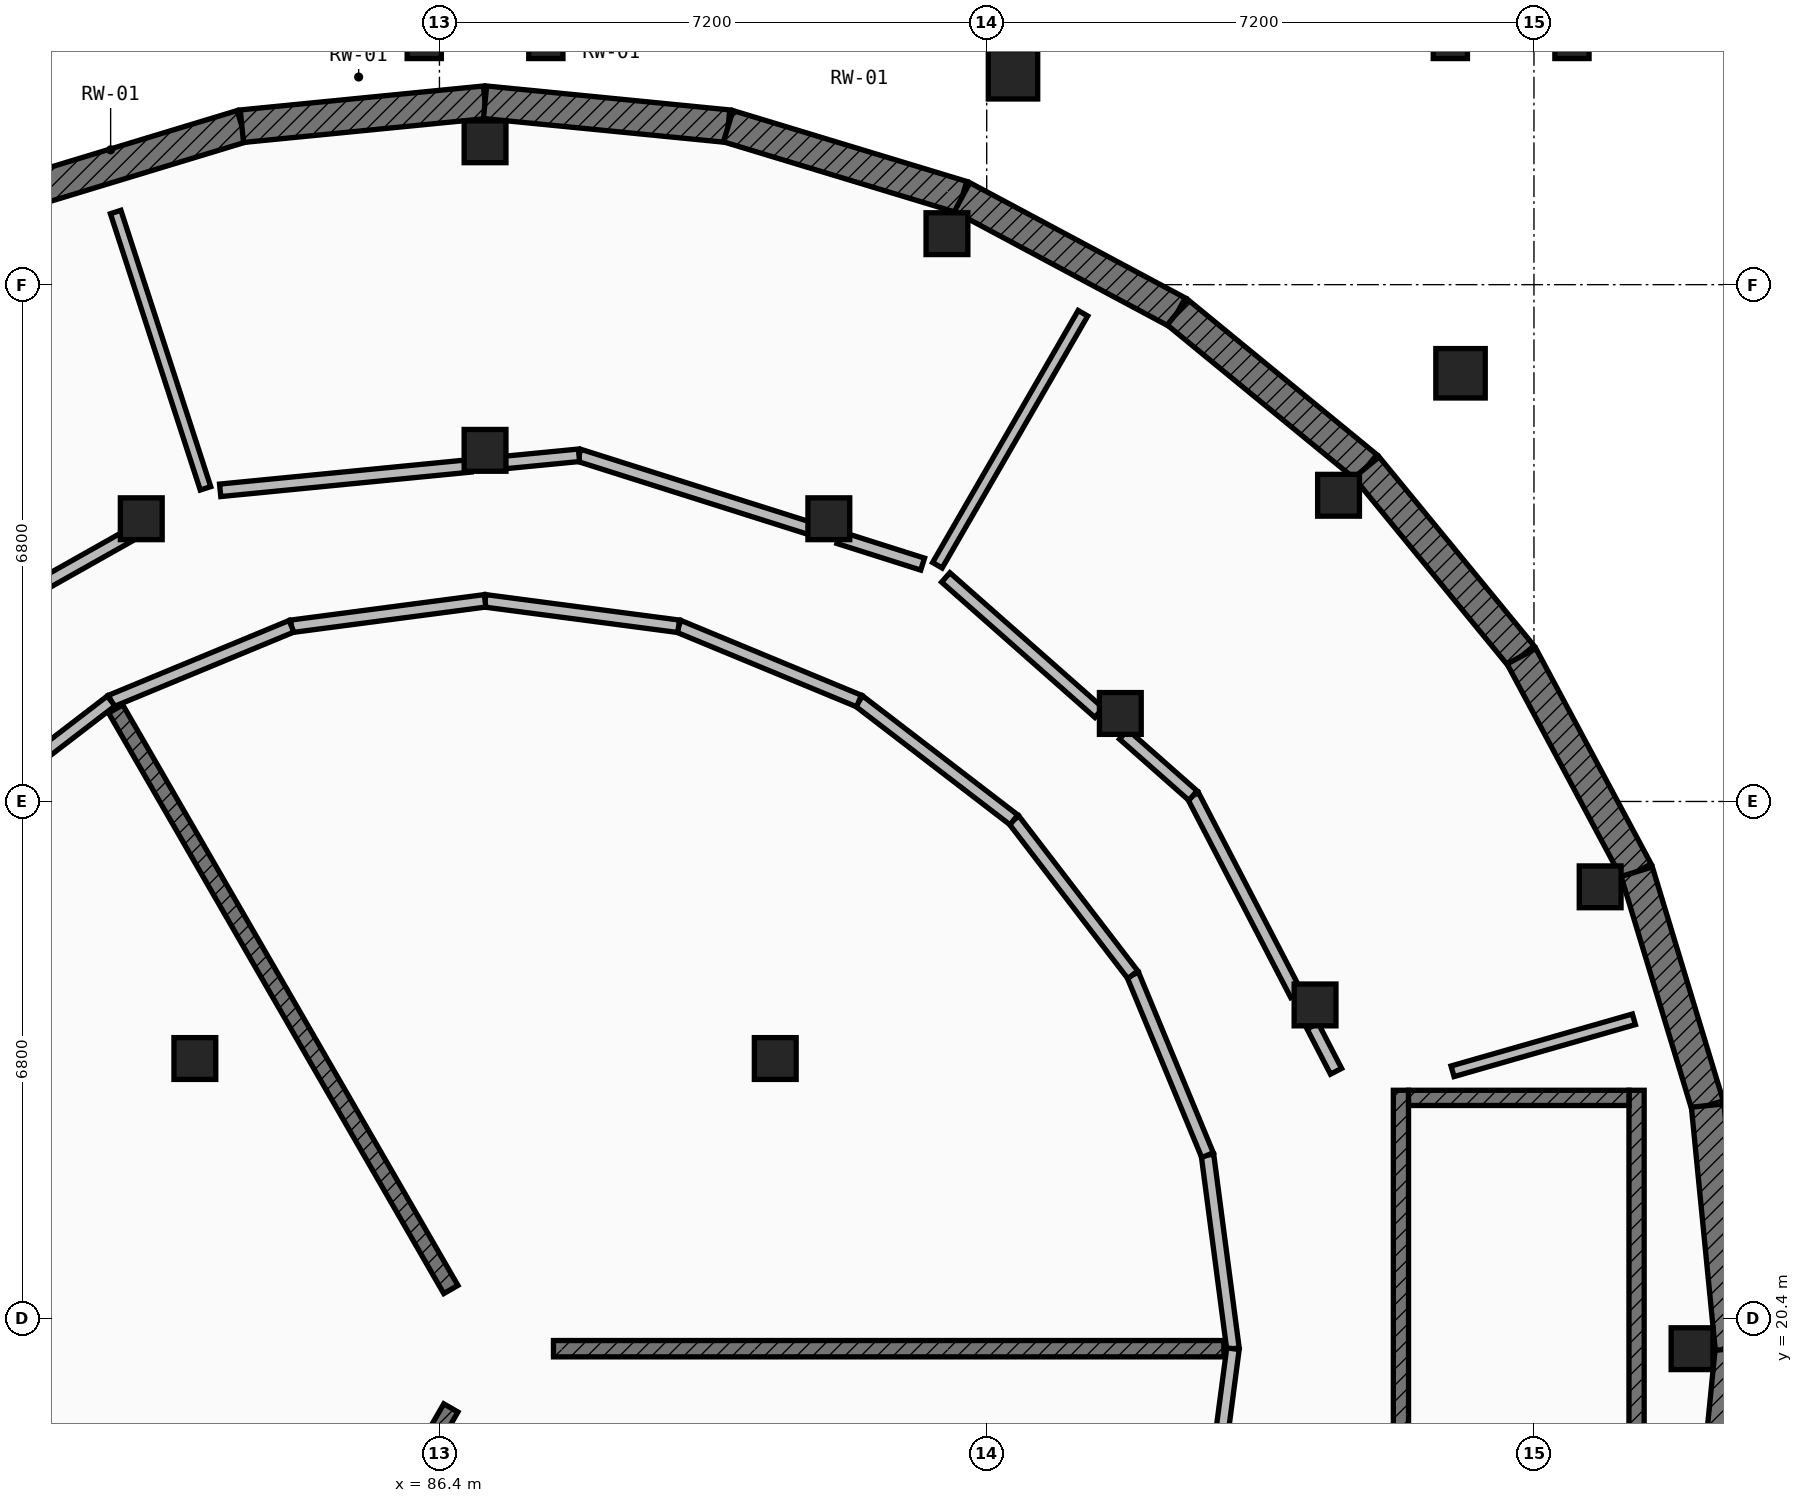
"""IFC4 building model, lengths in metres.
Left out: names, types, materials, properties, quantities, classifications, styles, units other than length and angle.
Written with IfcOpenShell. Run it as: python <this file> out.ifc"""

import sys

from ifc_helpers import new_model, si_unit, direction, frame, frame_2d, origin, origin_2d, place, context, subcontext, project, spatial, rectangle, extrude, element, fill, save


model = new_model("IFC4")
c1 = context("Model", 3, precision=1e-05, world=origin(), true_north=direction((0.0, 1.0)))
c2 = subcontext(c1, "Body", "Model", "MODEL_VIEW")
j1 = project(units=[si_unit("LENGTHUNIT", "METRE"), si_unit("PLANEANGLEUNIT", "RADIAN")], contexts=[c1])
p1 = place(None, origin())
s1 = spatial("IfcSite", under=j1, at=p1, CompositionType="ELEMENT")
p2 = place(p1, origin())
s2 = spatial("IfcBuilding", under=s1, at=p2, CompositionType="ELEMENT")
p3 = place(p2, frame((0.0, 0.0, -4.55)))
s3 = spatial("IfcBuildingStorey", under=s2, at=p3, CompositionType="ELEMENT", Elevation=-4.55)
for number, where, z_axis, x_axis in (
    (1, (102.88, 20.0, 0.0), (0.0, 0.0, 1.0), (1.0, 0.0, 0.0)),
    (2, (101.671, 26.077, 0.0), (0.0, 0.0, 1.0), (1.0, 0.0, 0.0)),
    (3, (98.229, 31.229, 0.0), (0.0, 0.0, 1.0), (1.0, 0.0, 0.0)),
    (4, (93.077, 34.671, 0.0), (0.0, 0.0, 1.0), (1.0, 0.0, 0.0)),
    (5, (87.0, 35.88, 0.0), (0.0, 0.0, 1.0), (1.0, 0.0, 0.0)),
    (6, (97.92, 24.523, 0.0), (0.0, 0.0, 1.0), (1.0, 0.0, 0.0)),
    (7, (95.358, 28.358, 0.0), (0.0, 0.0, 1.0), (1.0, 0.0, 0.0)),
    (8, (91.523, 30.92, 0.0), (0.0, 0.0, 1.0), (1.0, 0.0, 0.0)),
    (9, (87.0, 31.82, 0.0), (0.0, 0.0, 1.0), (1.0, 0.0, 0.0)),
    (10, (82.477, 30.92, 0.0), (0.0, 0.0, 1.0), (1.0, 0.0, 0.0)),
    (11, (90.818, 23.818, 0.0), (0.0, 0.0, 1.0), (1.0, 0.0, 0.0)),
    (12, (83.182, 23.818, 0.0), (0.0, 0.0, 1.0), (1.0, 0.0, 0.0)),
):
    element("IfcColumn", number, at=place(p3, frame(where, z_axis=z_axis, x_axis=x_axis)), inside=s3, PredefinedType="COLUMN", context=c2, shape_type="SweptSolid", body=[
        extrude(rectangle(XDim=0.55, YDim=0.55, at=origin_2d()), origin(), (0.0, 0.0, 1.0), 4.55),
    ])
for number, where, z_axis, x_axis in (
    (13, (99.834, 32.834, 0.0), (0.0, 0.0, 1.0), (1.0, 0.0, 0.0)),
    (14, (93.946, 36.768, 0.0), (0.0, 0.0, 1.0), (1.0, 0.0, 0.0)),
):
    element("IfcColumn", number, at=place(p3, frame(where, z_axis=z_axis, x_axis=x_axis)), inside=s3, PredefinedType="COLUMN", context=c2, shape_type="SweptSolid", body=[
        extrude(rectangle(XDim=0.65, YDim=0.65, at=origin_2d()), origin(), (0.0, 0.0, 1.0), 4.55),
    ])
for number, where, z_axis, x_axis in (
    (15, (99.7, 37.2, 0.0), (0.0, 0.0, 1.0), (1.0, 0.0, 0.0)),
    (16, (101.3, 37.2, 0.0), (0.0, 0.0, 1.0), (1.0, 0.0, 0.0)),
    (17, (86.2, 37.2, 0.0), (0.0, 0.0, 1.0), (1.0, 0.0, 0.0)),
    (18, (87.8, 37.2, 0.0), (0.0, 0.0, 1.0), (1.0, 0.0, 0.0)),
):
    element("IfcColumn", number, at=place(p3, frame(where, z_axis=z_axis, x_axis=x_axis)), inside=s3, PredefinedType="COLUMN", context=c2, shape_type="SweptSolid", body=[
        extrude(rectangle(XDim=0.45, YDim=0.45, at=origin_2d()), origin(), (0.0, 0.0, 1.0), 5.48),
    ])
p4 = place(p3, frame((103.4, 20.0, 0.0), z_axis=(0.0, 0.0, 1.0), x_axis=(-0.097977057849, -0.995188673637, 0.0)))
e19 = element("IfcWall", 19, at=p4, inside=s3, PredefinedType="USERDEFINED", context=c2, shape_type="SweptSolid", body=[
    extrude(rectangle(XDim=3.214, YDim=0.43, at=frame_2d((1.607, 0.0))), origin(), (0.0, 0.0, 1.0), 3.335),
])
p5 = place(p3, frame((80.724, 35.152, 0.0), z_axis=(0.0, 0.0, 1.0), x_axis=(0.956984161567, 0.29014016356, 0.0)))
e20 = element("IfcWall", 20, at=p5, inside=s3, PredefinedType="USERDEFINED", context=c2, shape_type="SweptSolid", body=[
    extrude(rectangle(XDim=3.215, YDim=0.43, at=frame_2d((1.607, 0.0))), origin(), (0.0, 0.0, 1.0), 3.335),
])
for number, where, z_axis, x_axis in (
    (21, (83.801, 36.085, 0.0), (0.0, 0.0, 1.0), (0.995, 0.098, 0.0)),
    (22, (87.0, 36.4, 0.0), (0.0, 0.0, 1.0), (0.995, -0.098, 0.0)),
):
    element("IfcWall", number, at=place(p3, frame(where, z_axis=z_axis, x_axis=x_axis)), inside=s3, PredefinedType="USERDEFINED", context=c2, shape_type="SweptSolid", body=[
        extrude(rectangle(XDim=3.214, YDim=0.43, at=frame_2d((1.607, 0.0))), origin(), (0.0, 0.0, 1.0), 3.335),
    ])
for number, where, z_axis, x_axis in (
    (23, (90.199, 36.085, 0.0), (0.0, 0.0, 1.0), (0.957, -0.29, 0.0)),
    (24, (93.276, 35.152, 0.0), (0.0, 0.0, 1.0), (0.882, -0.472, 0.0)),
    (25, (96.111, 33.636, 0.0), (0.0, 0.0, 1.0), (0.773, -0.634, 0.0)),
    (26, (98.597, 31.597, 0.0), (0.0, 0.0, 1.0), (0.634, -0.773, 0.0)),
    (27, (100.636, 29.111, 0.0), (0.0, 0.0, 1.0), (0.472, -0.882, 0.0)),
    (28, (102.152, 26.276, 0.0), (0.0, 0.0, 1.0), (0.29, -0.957, 0.0)),
):
    element("IfcWall", number, at=place(p3, frame(where, z_axis=z_axis, x_axis=x_axis)), inside=s3, PredefinedType="USERDEFINED", context=c2, shape_type="SweptSolid", body=[
        extrude(rectangle(XDim=3.215, YDim=0.43, at=frame_2d((1.607, 0.0))), origin(), (0.0, 0.0, 1.0), 3.335),
    ])
p6 = place(p3, frame((103.085, 23.199, 0.0), z_axis=(0.0, 0.0, 1.0), x_axis=(0.097977057849, -0.995188673637, 0.0)))
e29 = element("IfcWall", 29, at=p6, inside=s3, PredefinedType="USERDEFINED", context=c2, shape_type="SweptSolid", body=[
    extrude(rectangle(XDim=3.214, YDim=0.43, at=frame_2d((1.607, 0.0))), origin(), (0.0, 0.0, 1.0), 3.335),
])
p7 = place(p3, frame((99.05, 23.4, 0.0), z_axis=(0.0, 0.0, 1.0), x_axis=(0.0, -1.0, 0.0)))
e30 = element("IfcWall", 30, at=p7, inside=s3, PredefinedType="SHEAR", context=c2, shape_type="SweptSolid", body=[
    extrude(rectangle(XDim=6.8, YDim=0.2, at=frame_2d((3.4, 0.0))), origin(), (0.0, 0.0, 1.0), 4.135),
])
p8 = place(p7, frame((0.38, 0.0, 0.0)))
e31 = element("IfcOpeningElement", 31, at=p8, cuts=e30, PredefinedType="OPENING", context=c2, shape_type="SweptSolid", body=[
    extrude(rectangle(XDim=1.05, YDim=2.15, at=frame_2d((0.525, 1.075))), frame((0.0, 0.11, 0.0), z_axis=(0.0, -1.0, 0.0), x_axis=(1.0, 0.0, 0.0)), (0.0, 0.0, 1.0), 0.22),
])
p9 = place(p3, frame((102.15, 23.4, 0.0), z_axis=(0.0, 0.0, 1.0), x_axis=(0.0, -1.0, 0.0)))
e32 = element("IfcWall", 32, at=p9, inside=s3, PredefinedType="SHEAR", context=c2, shape_type="SweptSolid", body=[
    extrude(rectangle(XDim=6.8, YDim=0.2, at=frame_2d((3.4, 0.0))), origin(), (0.0, 0.0, 1.0), 4.135),
])
p10 = place(p3, frame((99.15, 23.3, 0.0), z_axis=(0.0, 0.0, 1.0), x_axis=(1.0, 0.0, 0.0)))
e33 = element("IfcWall", 33, at=p10, inside=s3, PredefinedType="SHEAR", context=c2, shape_type="SweptSolid", body=[
    extrude(rectangle(XDim=2.9, YDim=0.2, at=frame_2d((1.45, 0.0))), origin(), (0.0, 0.0, 1.0), 4.135),
])
p11 = place(p3, frame((87.9, 20.0, 0.0), z_axis=(0.0, 0.0, 1.0), x_axis=(1.0, 0.0, 0.0)))
e34 = element("IfcWall", 34, at=p11, inside=s3, PredefinedType="SOLIDWALL", context=c2, shape_type="SweptSolid", body=[
    extrude(rectangle(XDim=8.82, YDim=0.215, at=frame_2d((4.41, 0.0))), origin(), (0.0, 0.0, 1.0), 2.76),
])
for number, where, z_axis, x_axis in (
    (35, (86.55, 20.779, 0.0), (0.0, 0.0, 1.0), (-0.5, 0.866, 0.0)),
    (36, (86.55, 19.221, 0.0), (0.0, 0.0, 1.0), (-0.5, -0.866, 0.0)),
):
    element("IfcWall", number, at=place(p3, frame(where, z_axis=z_axis, x_axis=x_axis)), inside=s3, PredefinedType="SOLIDWALL", context=c2, shape_type="SweptSolid", body=[
        extrude(rectangle(XDim=8.821, YDim=0.215, at=frame_2d((4.41, 0.0))), origin(), (0.0, 0.0, 1.0), 2.76),
    ])
p12 = place(p3, frame((96.84, 20.0, 0.0), z_axis=(0.0, 0.0, 1.0), x_axis=(-0.130476636685, 0.991451384224, 0.0)))
e37 = element("IfcWall", 37, at=p12, inside=s3, PredefinedType="PARTITIONING", context=c2, shape_type="SweptSolid", body=[
    extrude(rectangle(XDim=2.569, YDim=0.165, at=frame_2d((1.285, 0.0))), origin(), (0.0, 0.0, 1.0), 2.76),
])
p13 = place(p3, frame((96.505, 22.547, 0.0), z_axis=(0.0, 0.0, 1.0), x_axis=(-0.382704397106, 0.923870848353, 0.0)))
e38 = element("IfcWall", 38, at=p13, inside=s3, PredefinedType="PARTITIONING", context=c2, shape_type="SweptSolid", body=[
    extrude(rectangle(XDim=2.568, YDim=0.165, at=frame_2d((1.284, 0.0))), origin(), (0.0, 0.0, 1.0), 2.76),
])
p14 = place(p3, frame((95.522, 24.92, 0.0), z_axis=(0.0, 0.0, 1.0), x_axis=(-0.608782621434, 0.793337078322, 0.0)))
e39 = element("IfcWall", 39, at=p14, inside=s3, PredefinedType="PARTITIONING", context=c2, shape_type="SweptSolid", body=[
    extrude(rectangle(XDim=2.569, YDim=0.165, at=frame_2d((1.285, 0.0))), origin(), (0.0, 0.0, 1.0), 2.76),
])
p15 = place(p3, frame((93.958, 26.958, 0.0), z_axis=(0.0, 0.0, 1.0), x_axis=(-0.793337078322, 0.608782621434, 0.0)))
e40 = element("IfcWall", 40, at=p15, inside=s3, PredefinedType="PARTITIONING", context=c2, shape_type="SweptSolid", body=[
    extrude(rectangle(XDim=2.569, YDim=0.165, at=frame_2d((1.285, 0.0))), origin(), (0.0, 0.0, 1.0), 2.76),
])
p16 = place(p15, frame((0.584, 0.0, 0.0)))
e41 = element("IfcOpeningElement", 41, at=p16, cuts=e40, PredefinedType="OPENING", context=c2, shape_type="SweptSolid", body=[
    extrude(rectangle(XDim=1.4, YDim=2.25, at=frame_2d((0.7, 1.125))), frame((0.0, 0.093, 0.0), z_axis=(0.0, -1.0, 0.0), x_axis=(1.0, 0.0, 0.0)), (0.0, 0.0, 1.0), 0.185),
])
p17 = place(p3, frame((91.92, 28.522, 0.0), z_axis=(0.0, 0.0, 1.0), x_axis=(-0.923870848353, 0.382704397106, 0.0)))
e42 = element("IfcWall", 42, at=p17, inside=s3, PredefinedType="PARTITIONING", context=c2, shape_type="SweptSolid", body=[
    extrude(rectangle(XDim=2.568, YDim=0.165, at=frame_2d((1.284, 0.0))), origin(), (0.0, 0.0, 1.0), 2.76),
])
for number, where, z_axis, x_axis in (
    (43, (89.547, 29.505, 0.0), (0.0, 0.0, 1.0), (-0.991, 0.13, 0.0)),
    (44, (87.0, 29.84, 0.0), (0.0, 0.0, 1.0), (-0.991, -0.13, 0.0)),
):
    element("IfcWall", number, at=place(p3, frame(where, z_axis=z_axis, x_axis=x_axis)), inside=s3, PredefinedType="PARTITIONING", context=c2, shape_type="SweptSolid", body=[
        extrude(rectangle(XDim=2.569, YDim=0.165, at=frame_2d((1.285, 0.0))), origin(), (0.0, 0.0, 1.0), 2.76),
    ])
p18 = place(p3, frame((84.453, 29.505, 0.0), z_axis=(0.0, 0.0, 1.0), x_axis=(-0.923870848353, -0.382704397106, 0.0)))
e45 = element("IfcWall", 45, at=p18, inside=s3, PredefinedType="PARTITIONING", context=c2, shape_type="SweptSolid", body=[
    extrude(rectangle(XDim=2.568, YDim=0.165, at=frame_2d((1.284, 0.0))), origin(), (0.0, 0.0, 1.0), 2.76),
])
for number, where, z_axis, x_axis in (
    (46, (82.08, 28.522, 0.0), (0.0, 0.0, 1.0), (-0.793, -0.609, 0.0)),
    (47, (96.505, 17.453, 0.0), (0.0, 0.0, 1.0), (0.13, 0.991, 0.0)),
):
    element("IfcWall", number, at=place(p3, frame(where, z_axis=z_axis, x_axis=x_axis)), inside=s3, PredefinedType="PARTITIONING", context=c2, shape_type="SweptSolid", body=[
        extrude(rectangle(XDim=2.569, YDim=0.165, at=frame_2d((1.285, 0.0))), origin(), (0.0, 0.0, 1.0), 2.76),
    ])
p19 = place(p3, frame((99.729, 23.65, 0.0), z_axis=(0.0, 0.0, 1.0), x_axis=(0.96127114667, 0.275604395065, 0.0)))
e48 = element("IfcWall", 48, at=p19, inside=s3, PredefinedType="PARTITIONING", context=c2, shape_type="SweptSolid", body=[
    extrude(rectangle(XDim=2.482, YDim=0.145, at=frame_2d((1.241, 0.0))), origin(), (0.0, 0.0, 1.0), 2.76),
])
p20 = place(p3, frame((92.951, 30.308, 0.0), z_axis=(0.0, 0.0, 1.0), x_axis=(0.500116129234, 0.865958346157, 0.0)))
e49 = element("IfcWall", 49, at=p20, inside=s3, PredefinedType="PARTITIONING", context=c2, shape_type="SweptSolid", body=[
    extrude(rectangle(XDim=3.829, YDim=0.145, at=frame_2d((1.915, 0.0))), origin(), (0.0, 0.0, 1.0), 2.76),
])
p21 = place(p3, frame((83.322, 31.32, 0.0), z_axis=(0.0, 0.0, 1.0), x_axis=(-0.309188585957, 0.951000745696, 0.0)))
e50 = element("IfcWall", 50, at=p21, inside=s3, PredefinedType="PARTITIONING", context=c2, shape_type="SweptSolid", body=[
    extrude(rectangle(XDim=3.823, YDim=0.145, at=frame_2d((1.912, 0.0))), origin(), (0.0, 0.0, 1.0), 2.76),
])
p22 = place(p3, frame((98.196, 23.65, 0.0), z_axis=(0.0, 0.0, 1.0), x_axis=(-0.459700365361, 0.888074081418, 0.0)))
e51 = element("IfcWall", 51, at=p22, inside=s3, PredefinedType="PARTITIONING", context=c2, shape_type="SweptSolid", body=[
    extrude(rectangle(XDim=0.67, YDim=0.165, at=frame_2d((0.335, 0.0))), origin(), (0.0, 0.0, 1.0), 2.76),
])
p23 = place(p3, frame((97.674, 24.657, 0.0), z_axis=(0.0, 0.0, 1.0), x_axis=(-0.460725075704, 0.887542902973, 0.0)))
e52 = element("IfcWall", 52, at=p23, inside=s3, PredefinedType="PARTITIONING", context=c2, shape_type="SweptSolid", body=[
    extrude(rectangle(XDim=2.952, YDim=0.165, at=frame_2d((1.476, 0.0))), origin(), (0.0, 0.0, 1.0), 2.76),
])
p24 = place(p23, frame((0.886, 0.0, 0.0)))
e53 = element("IfcOpeningElement", 53, at=p24, cuts=e52, PredefinedType="OPENING", context=c2, shape_type="SweptSolid", body=[
    extrude(rectangle(XDim=1.18, YDim=2.2, at=frame_2d((0.59, 1.1))), frame((0.0, 0.093, 0.0), z_axis=(0.0, -1.0, 0.0), x_axis=(1.0, 0.0, 0.0)), (0.0, 0.0, 1.0), 0.185),
])
p25 = place(p3, frame((96.314, 27.277, 0.0), z_axis=(0.0, 0.0, 1.0), x_axis=(-0.749697254826, 0.661780950244, 0.0)))
e54 = element("IfcWall", 54, at=p25, inside=s3, PredefinedType="PARTITIONING", context=c2, shape_type="SweptSolid", body=[
    extrude(rectangle(XDim=1.216, YDim=0.165, at=frame_2d((0.608, 0.0))), origin(), (0.0, 0.0, 1.0), 2.76),
])
p26 = place(p3, frame((95.078, 28.368, 0.0), z_axis=(0.0, 0.0, 1.0), x_axis=(-0.749753094518, 0.661717686979, 0.0)))
e55 = element("IfcWall", 55, at=p26, inside=s3, PredefinedType="PARTITIONING", context=c2, shape_type="SweptSolid", body=[
    extrude(rectangle(XDim=2.69, YDim=0.165, at=frame_2d((1.345, 0.0))), origin(), (0.0, 0.0, 1.0), 2.76),
])
p27 = place(p3, frame((92.757, 30.323, 0.0), z_axis=(0.0, 0.0, 1.0), x_axis=(-0.95314164885, 0.302524374602, 0.0)))
e56 = element("IfcWall", 56, at=p27, inside=s3, PredefinedType="PARTITIONING", context=c2, shape_type="SweptSolid", body=[
    extrude(rectangle(XDim=1.157, YDim=0.165, at=frame_2d((0.579, 0.0))), origin(), (0.0, 0.0, 1.0), 2.76),
])
p28 = place(p3, frame((91.274, 30.793, 0.0), z_axis=(0.0, 0.0, 1.0), x_axis=(-0.953348472905, 0.301871974865, 0.0)))
e57 = element("IfcWall", 57, at=p28, inside=s3, PredefinedType="PARTITIONING", context=c2, shape_type="SweptSolid", body=[
    extrude(rectangle(XDim=3.187, YDim=0.165, at=frame_2d((1.593, 0.0))), origin(), (0.0, 0.0, 1.0), 2.76),
])
p29 = place(p28, frame((1.133, 0.0, 0.0)))
e58 = element("IfcOpeningElement", 58, at=p29, cuts=e57, PredefinedType="OPENING", context=c2, shape_type="SweptSolid", body=[
    extrude(rectangle(XDim=0.92, YDim=2.12, at=frame_2d((0.46, 1.06))), frame((0.0, 0.093, 0.0), z_axis=(0.0, -1.0, 0.0), x_axis=(1.0, 0.0, 0.0)), (0.0, 0.0, 1.0), 0.185),
])
p30 = place(p3, frame((88.236, 31.755, 0.0), z_axis=(0.0, 0.0, 1.0), x_axis=(-0.995326148944, -0.096570478037, 0.0)))
e59 = element("IfcWall", 59, at=p30, inside=s3, PredefinedType="PARTITIONING", context=c2, shape_type="SweptSolid", body=[
    extrude(rectangle(XDim=1.014, YDim=0.165, at=frame_2d((0.507, 0.0))), origin(), (0.0, 0.0, 1.0), 2.76),
])
p31 = place(p3, frame((86.809, 31.616, 0.0), z_axis=(0.0, 0.0, 1.0), x_axis=(-0.995256012435, -0.09729064555, 0.0)))
e60 = element("IfcWall", 60, at=p31, inside=s3, PredefinedType="PARTITIONING", context=c2, shape_type="SweptSolid", body=[
    extrude(rectangle(XDim=3.31, YDim=0.165, at=frame_2d((1.655, 0.0))), origin(), (0.0, 0.0, 1.0), 2.76),
])
p32 = place(p3, frame((82.311, 30.695, 0.0), z_axis=(0.0, 0.0, 1.0), x_axis=(-0.871081128007, -0.491139153836, 0.0)))
e61 = element("IfcWall", 61, at=p32, inside=s3, PredefinedType="PARTITIONING", context=c2, shape_type="SweptSolid", body=[
    extrude(rectangle(XDim=3.339, YDim=0.165, at=frame_2d((1.67, 0.0))), origin(), (0.0, 0.0, 1.0), 2.76),
])
p33 = place(p32, frame((1.08, 0.0, 0.0)))
e62 = element("IfcOpeningElement", 62, at=p33, cuts=e61, PredefinedType="OPENING", context=c2, shape_type="SweptSolid", body=[
    extrude(rectangle(XDim=1.18, YDim=2.2, at=frame_2d((0.59, 1.1))), frame((0.0, 0.093, 0.0), z_axis=(0.0, -1.0, 0.0), x_axis=(1.0, 0.0, 0.0)), (0.0, 0.0, 1.0), 0.185),
])
p34 = place(p8, origin())
e63 = element("IfcDoor", 63, at=p34, inside=s3, OperationType="SINGLE_SWING_RIGHT", PredefinedType="DOOR", context=c2, shape_type="SweptSolid", body=[
    extrude(rectangle(XDim=1.05, YDim=2.15, at=frame_2d((0.525, 1.075))), frame((0.0, 0.025, 0.0), z_axis=(0.0, -1.0, 0.0), x_axis=(1.0, 0.0, 0.0)), (0.0, 0.0, 1.0), 0.05),
])
fill(e31, e63)
p35 = place(p16, origin())
e64 = element("IfcDoor", 64, at=p35, inside=s3, OperationType="SINGLE_SWING_LEFT", PredefinedType="DOOR", context=c2, shape_type="SweptSolid", body=[
    extrude(rectangle(XDim=1.4, YDim=2.25, at=frame_2d((0.7, 1.125))), frame((0.0, 0.025, 0.0), z_axis=(0.0, -1.0, 0.0), x_axis=(1.0, 0.0, 0.0)), (0.0, 0.0, 1.0), 0.05),
])
fill(e41, e64)
p36 = place(p24, origin())
e65 = element("IfcDoor", 65, at=p36, inside=s3, OperationType="SINGLE_SWING_RIGHT", PredefinedType="DOOR", context=c2, shape_type="SweptSolid", body=[
    extrude(rectangle(XDim=1.18, YDim=2.2, at=frame_2d((0.59, 1.1))), frame((0.0, 0.025, 0.0), z_axis=(0.0, -1.0, 0.0), x_axis=(1.0, 0.0, 0.0)), (0.0, 0.0, 1.0), 0.05),
])
fill(e53, e65)
p37 = place(p29, origin())
e66 = element("IfcDoor", 66, at=p37, inside=s3, OperationType="SINGLE_SWING_LEFT", PredefinedType="DOOR", context=c2, shape_type="SweptSolid", body=[
    extrude(rectangle(XDim=0.92, YDim=2.12, at=frame_2d((0.46, 1.06))), frame((0.0, 0.025, 0.0), z_axis=(0.0, -1.0, 0.0), x_axis=(1.0, 0.0, 0.0)), (0.0, 0.0, 1.0), 0.05),
])
fill(e58, e66)
p38 = place(p33, origin())
e67 = element("IfcDoor", 67, at=p38, inside=s3, OperationType="SINGLE_SWING_RIGHT", PredefinedType="DOOR", context=c2, shape_type="SweptSolid", body=[
    extrude(rectangle(XDim=1.18, YDim=2.2, at=frame_2d((0.59, 1.1))), frame((0.0, 0.025, 0.0), z_axis=(0.0, -1.0, 0.0), x_axis=(1.0, 0.0, 0.0)), (0.0, 0.0, 1.0), 0.05),
])
fill(e62, e67)
save(model, sys.argv[1])
